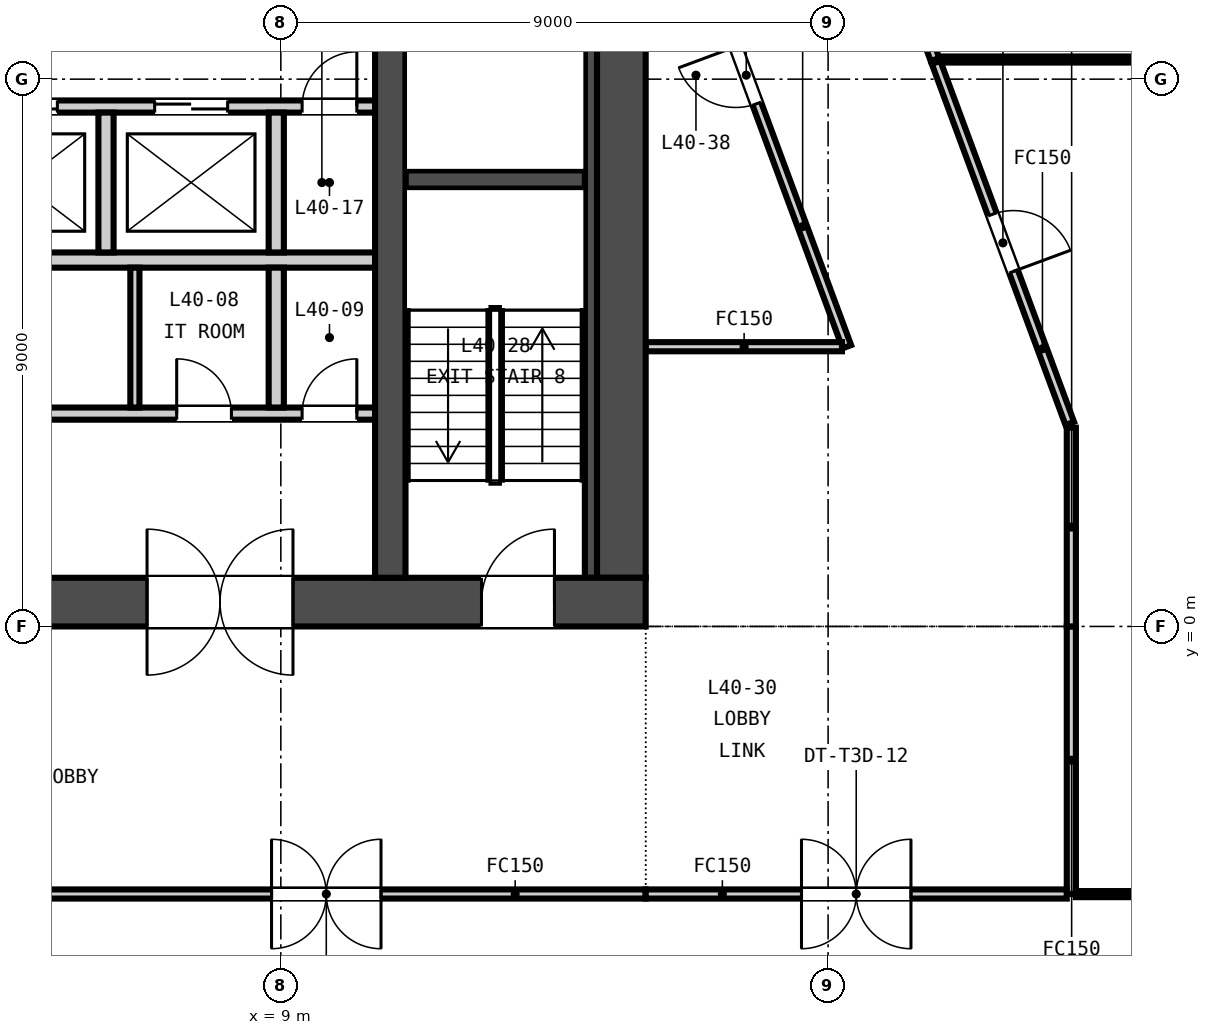
"""IFC4 building model, lengths in metres.
Left out: names, types, materials, properties, quantities, classifications, styles, units other than length and angle.
Written with IfcOpenShell. Run it as: python <this file> out.ifc"""

import sys

from ifc_helpers import new_model, si_unit, direction, frame, frame_2d, origin, place, context, subcontext, project, spatial, rectangle, extrude, element, fill, save


model = new_model("IFC4")
c1 = context("Model", 3, precision=1e-05, world=origin(), true_north=direction((0.0, 1.0)))
c2 = subcontext(c1, "Body", "Model", "MODEL_VIEW")
j1 = project(units=[si_unit("LENGTHUNIT", "METRE"), si_unit("PLANEANGLEUNIT", "RADIAN")], contexts=[c1])
p1 = place(None, origin())
s1 = spatial("IfcSite", under=j1, at=p1, CompositionType="ELEMENT")
p2 = place(p1, origin())
s2 = spatial("IfcBuilding", under=s1, at=p2, CompositionType="ELEMENT")
p3 = place(p2, frame((0.0, 0.0, 162.65)))
s3 = spatial("IfcBuildingStorey", under=s2, at=p3, CompositionType="ELEMENT", Elevation=162.65)
p4 = place(p3, frame((-15.0, 0.4, -0.15), z_axis=(0.0, 0.0, 1.0), x_axis=(1.0, 0.0, 0.0)))
e1 = element("IfcWall", 1, at=p4, inside=s3, PredefinedType="SOLIDWALL", context=c2, shape_type="SweptSolid", body=[
    extrude(rectangle(XDim=30.0, YDim=0.8, at=frame_2d((15.0, 0.0))), origin(), (0.0, 0.0, 1.0), 3.5),
])
p5 = place(p4, frame((5.8, 0.0, 0.15)))
e2 = element("IfcOpeningElement", 2, at=p5, cuts=e1, PredefinedType="OPENING", context=c2, shape_type="SweptSolid", body=[
    extrude(rectangle(XDim=2.4, YDim=2.4, at=frame_2d((1.2, 1.2))), frame((0.0, 0.41, 0.0), z_axis=(0.0, -1.0, 0.0), x_axis=(1.0, 0.0, 0.0)), (0.0, 0.0, 1.0), 0.82),
])
p6 = place(p4, frame((13.8, 0.0, 0.15)))
e3 = element("IfcOpeningElement", 3, at=p6, cuts=e1, PredefinedType="OPENING", context=c2, shape_type="SweptSolid", body=[
    extrude(rectangle(XDim=2.4, YDim=2.4, at=frame_2d((1.2, 1.2))), frame((0.0, 0.41, 0.0), z_axis=(0.0, -1.0, 0.0), x_axis=(1.0, 0.0, 0.0)), (0.0, 0.0, 1.0), 0.82),
])
p7 = place(p4, frame((21.8, 0.0, 0.15)))
e4 = element("IfcOpeningElement", 4, at=p7, cuts=e1, PredefinedType="OPENING", context=c2, shape_type="SweptSolid", body=[
    extrude(rectangle(XDim=2.4, YDim=2.4, at=frame_2d((1.2, 1.2))), frame((0.0, 0.41, 0.0), z_axis=(0.0, -1.0, 0.0), x_axis=(1.0, 0.0, 0.0)), (0.0, 0.0, 1.0), 0.82),
])
p8 = place(p4, frame((1.5, 0.0, 0.15)))
e5 = element("IfcOpeningElement", 5, at=p8, cuts=e1, PredefinedType="OPENING", context=c2, shape_type="SweptSolid", body=[
    extrude(rectangle(XDim=1.2, YDim=2.1, at=frame_2d((0.6, 1.05))), frame((0.0, 0.41, 0.0), z_axis=(0.0, -1.0, 0.0), x_axis=(1.0, 0.0, 0.0)), (0.0, 0.0, 1.0), 0.82),
])
p9 = place(p4, frame((27.3, 0.0, 0.15)))
e6 = element("IfcOpeningElement", 6, at=p9, cuts=e1, PredefinedType="OPENING", context=c2, shape_type="SweptSolid", body=[
    extrude(rectangle(XDim=1.2, YDim=2.1, at=frame_2d((0.6, 1.05))), frame((0.0, 0.41, 0.0), z_axis=(0.0, -1.0, 0.0), x_axis=(1.0, 0.0, 0.0)), (0.0, 0.0, 1.0), 0.82),
])
p10 = place(p3, frame((14.6, 0.8, -0.15), z_axis=(0.0, 0.0, 1.0), x_axis=(0.0, 1.0, 0.0)))
e7 = element("IfcWall", 7, at=p10, inside=s3, PredefinedType="SOLIDWALL", context=c2, shape_type="SweptSolid", body=[
    extrude(rectangle(XDim=13.4, YDim=0.8, at=frame_2d((6.7, 0.0))), origin(), (0.0, 0.0, 1.0), 3.5),
])
p11 = place(p3, frame((10.8, 0.8, -0.15), z_axis=(0.0, 0.0, 1.0), x_axis=(0.0, 1.0, 0.0)))
e8 = element("IfcWall", 8, at=p11, inside=s3, PredefinedType="SOLIDWALL", context=c2, shape_type="SweptSolid", body=[
    extrude(rectangle(XDim=13.4, YDim=0.5, at=frame_2d((6.7, 0.0))), origin(), (0.0, 0.0, 1.0), 3.5),
])
p12 = place(p3, frame((-10.55, 3.5, 0.0), z_axis=(0.0, 0.0, 1.0), x_axis=(1.0, 0.0, 0.0)))
e9 = element("IfcWall", 9, at=p12, inside=s3, PredefinedType="PARTITIONING", context=c2, shape_type="SweptSolid", body=[
    extrude(rectangle(XDim=21.1, YDim=0.2, at=frame_2d((10.55, 0.0))), origin(), (0.0, 0.0, 1.0), 3.35),
])
p13 = place(p12, frame((2.312, 0.0, 0.0)))
e10 = element("IfcOpeningElement", 10, at=p13, cuts=e9, PredefinedType="OPENING", context=c2, shape_type="SweptSolid", body=[
    extrude(rectangle(XDim=1.0, YDim=2.1, at=frame_2d((0.5, 1.05))), frame((0.0, 0.11, 0.0), z_axis=(0.0, -1.0, 0.0), x_axis=(1.0, 0.0, 0.0)), (0.0, 0.0, 1.0), 0.22),
])
p14 = place(p12, frame((7.05, 0.0, 0.0)))
e11 = element("IfcOpeningElement", 11, at=p14, cuts=e9, PredefinedType="OPENING", context=c2, shape_type="SweptSolid", body=[
    extrude(rectangle(XDim=1.0, YDim=2.1, at=frame_2d((0.5, 1.05))), frame((0.0, 0.11, 0.0), z_axis=(0.0, -1.0, 0.0), x_axis=(1.0, 0.0, 0.0)), (0.0, 0.0, 1.0), 0.22),
])
p15 = place(p12, frame((10.175, 0.0, 0.0)))
e12 = element("IfcOpeningElement", 12, at=p15, cuts=e9, PredefinedType="OPENING", context=c2, shape_type="SweptSolid", body=[
    extrude(rectangle(XDim=1.0, YDim=2.1, at=frame_2d((0.5, 1.05))), frame((0.0, 0.11, 0.0), z_axis=(0.0, -1.0, 0.0), x_axis=(1.0, 0.0, 0.0)), (0.0, 0.0, 1.0), 0.22),
])
p16 = place(p12, frame((14.05, 0.0, 0.0)))
e13 = element("IfcOpeningElement", 13, at=p16, cuts=e9, PredefinedType="OPENING", context=c2, shape_type="SweptSolid", body=[
    extrude(rectangle(XDim=1.0, YDim=2.1, at=frame_2d((0.5, 1.05))), frame((0.0, 0.11, 0.0), z_axis=(0.0, -1.0, 0.0), x_axis=(1.0, 0.0, 0.0)), (0.0, 0.0, 1.0), 0.22),
])
p17 = place(p12, frame((17.837, 0.0, 0.0)))
e14 = element("IfcOpeningElement", 14, at=p17, cuts=e9, PredefinedType="OPENING", context=c2, shape_type="SweptSolid", body=[
    extrude(rectangle(XDim=0.9, YDim=2.1, at=frame_2d((0.45, 1.05))), frame((0.0, 0.11, 0.0), z_axis=(0.0, -1.0, 0.0), x_axis=(1.0, 0.0, 0.0)), (0.0, 0.0, 1.0), 0.22),
])
p18 = place(p12, frame((19.9, 0.0, 0.0)))
e15 = element("IfcOpeningElement", 15, at=p18, cuts=e9, PredefinedType="OPENING", context=c2, shape_type="SweptSolid", body=[
    extrude(rectangle(XDim=0.9, YDim=2.1, at=frame_2d((0.45, 1.05))), frame((0.0, 0.11, 0.0), z_axis=(0.0, -1.0, 0.0), x_axis=(1.0, 0.0, 0.0)), (0.0, 0.0, 1.0), 0.22),
])
p19 = place(p3, frame((-10.55, 6.025, 0.0), z_axis=(0.0, 0.0, 1.0), x_axis=(1.0, 0.0, 0.0)))
e16 = element("IfcWall", 16, at=p19, inside=s3, PredefinedType="PARTITIONING", context=c2, shape_type="SweptSolid", body=[
    extrude(rectangle(XDim=21.1, YDim=0.25, at=frame_2d((10.55, 0.0))), origin(), (0.0, 0.0, 1.0), 3.35),
])
p20 = place(p3, frame((-10.55, 8.55, 0.0), z_axis=(0.0, 0.0, 1.0), x_axis=(1.0, 0.0, 0.0)))
e17 = element("IfcWall", 17, at=p20, inside=s3, PredefinedType="PARTITIONING", context=c2, shape_type="SweptSolid", body=[
    extrude(rectangle(XDim=21.1, YDim=0.2, at=frame_2d((10.55, 0.0))), origin(), (0.0, 0.0, 1.0), 3.35),
])
p21 = place(p20, frame((0.675, 0.0, 0.0)))
e18 = element("IfcOpeningElement", 18, at=p21, cuts=e17, PredefinedType="OPENING", context=c2, shape_type="SweptSolid", body=[
    extrude(rectangle(XDim=1.2, YDim=2.1, at=frame_2d((0.6, 1.05))), frame((0.0, 0.11, 0.0), z_axis=(0.0, -1.0, 0.0), x_axis=(1.0, 0.0, 0.0)), (0.0, 0.0, 1.0), 0.22),
])
p22 = place(p20, frame((3.475, 0.0, 0.0)))
e19 = element("IfcOpeningElement", 19, at=p22, cuts=e17, PredefinedType="OPENING", context=c2, shape_type="SweptSolid", body=[
    extrude(rectangle(XDim=1.2, YDim=2.1, at=frame_2d((0.6, 1.05))), frame((0.0, 0.11, 0.0), z_axis=(0.0, -1.0, 0.0), x_axis=(1.0, 0.0, 0.0)), (0.0, 0.0, 1.0), 0.22),
])
p23 = place(p20, frame((6.275, 0.0, 0.0)))
e20 = element("IfcOpeningElement", 20, at=p23, cuts=e17, PredefinedType="OPENING", context=c2, shape_type="SweptSolid", body=[
    extrude(rectangle(XDim=1.2, YDim=2.1, at=frame_2d((0.6, 1.05))), frame((0.0, 0.11, 0.0), z_axis=(0.0, -1.0, 0.0), x_axis=(1.0, 0.0, 0.0)), (0.0, 0.0, 1.0), 0.22),
])
p24 = place(p20, frame((9.075, 0.0, 0.0)))
e21 = element("IfcOpeningElement", 21, at=p24, cuts=e17, PredefinedType="OPENING", context=c2, shape_type="SweptSolid", body=[
    extrude(rectangle(XDim=1.2, YDim=2.1, at=frame_2d((0.6, 1.05))), frame((0.0, 0.11, 0.0), z_axis=(0.0, -1.0, 0.0), x_axis=(1.0, 0.0, 0.0)), (0.0, 0.0, 1.0), 0.22),
])
p25 = place(p20, frame((11.875, 0.0, 0.0)))
e22 = element("IfcOpeningElement", 22, at=p25, cuts=e17, PredefinedType="OPENING", context=c2, shape_type="SweptSolid", body=[
    extrude(rectangle(XDim=1.2, YDim=2.1, at=frame_2d((0.6, 1.05))), frame((0.0, 0.11, 0.0), z_axis=(0.0, -1.0, 0.0), x_axis=(1.0, 0.0, 0.0)), (0.0, 0.0, 1.0), 0.22),
])
p26 = place(p20, frame((14.675, 0.0, 0.0)))
e23 = element("IfcOpeningElement", 23, at=p26, cuts=e17, PredefinedType="OPENING", context=c2, shape_type="SweptSolid", body=[
    extrude(rectangle(XDim=1.2, YDim=2.1, at=frame_2d((0.6, 1.05))), frame((0.0, 0.11, 0.0), z_axis=(0.0, -1.0, 0.0), x_axis=(1.0, 0.0, 0.0)), (0.0, 0.0, 1.0), 0.22),
])
p27 = place(p20, frame((17.475, 0.0, 0.0)))
e24 = element("IfcOpeningElement", 24, at=p27, cuts=e17, PredefinedType="OPENING", context=c2, shape_type="SweptSolid", body=[
    extrude(rectangle(XDim=1.2, YDim=2.1, at=frame_2d((0.6, 1.05))), frame((0.0, 0.11, 0.0), z_axis=(0.0, -1.0, 0.0), x_axis=(1.0, 0.0, 0.0)), (0.0, 0.0, 1.0), 0.22),
])
p28 = place(p20, frame((19.9, 0.0, 0.0)))
e25 = element("IfcOpeningElement", 25, at=p28, cuts=e17, PredefinedType="OPENING", context=c2, shape_type="SweptSolid", body=[
    extrude(rectangle(XDim=0.9, YDim=2.1, at=frame_2d((0.45, 1.05))), frame((0.0, 0.11, 0.0), z_axis=(0.0, -1.0, 0.0), x_axis=(1.0, 0.0, 0.0)), (0.0, 0.0, 1.0), 0.22),
])
p29 = place(p3, frame((6.6, 3.6, 0.0), z_axis=(0.0, 0.0, 1.0), x_axis=(0.0, 1.0, 0.0)))
e26 = element("IfcWall", 26, at=p29, inside=s3, PredefinedType="PARTITIONING", context=c2, shape_type="SweptSolid", body=[
    extrude(rectangle(XDim=2.3, YDim=0.15, at=frame_2d((1.15, 0.0))), origin(), (0.0, 0.0, 1.0), 3.35),
])
p30 = place(p3, frame((8.925, 3.6, 0.0), z_axis=(0.0, 0.0, 1.0), x_axis=(0.0, 1.0, 0.0)))
e27 = element("IfcWall", 27, at=p30, inside=s3, PredefinedType="PARTITIONING", context=c2, shape_type="SweptSolid", body=[
    extrude(rectangle(XDim=2.3, YDim=0.25, at=frame_2d((1.15, 0.0))), origin(), (0.0, 0.0, 1.0), 3.35),
])
for number, where, z_axis, x_axis in (
    (28, (6.125, 6.15, 0.0), (0.0, 0.0, 1.0), (0.0, 1.0, 0.0)),
    (29, (8.925, 6.15, 0.0), (0.0, 0.0, 1.0), (0.0, 1.0, 0.0)),
):
    element("IfcWall", number, at=place(p3, frame(where, z_axis=z_axis, x_axis=x_axis)), inside=s3, PredefinedType="PARTITIONING", context=c2, shape_type="SweptSolid", body=[
        extrude(rectangle(XDim=2.3, YDim=0.25, at=frame_2d((1.15, 0.0))), origin(), (0.0, 0.0, 1.0), 3.35),
    ])
p31 = place(p3, frame((11.05, 7.35, 0.0), z_axis=(0.0, 0.0, 1.0), x_axis=(1.0, 0.0, 0.0)))
e30 = element("IfcWall", 30, at=p31, inside=s3, PredefinedType="SOLIDWALL", context=c2, shape_type="SweptSolid", body=[
    extrude(rectangle(XDim=2.95, YDim=0.3, at=frame_2d((1.475, 0.0))), origin(), (0.0, 0.0, 1.0), 3.35),
])
p32 = place(p3, frame((14.1, 0.8, 0.0), z_axis=(0.0, 0.0, 1.0), x_axis=(0.0, 1.0, 0.0)))
e31 = element("IfcWall", 31, at=p32, inside=s3, PredefinedType="SOLIDWALL", context=c2, shape_type="SweptSolid", body=[
    extrude(rectangle(XDim=13.4, YDim=0.2, at=frame_2d((6.7, 0.0))), origin(), (0.0, 0.0, 1.0), 3.35),
])
p33 = place(p3, frame((15.0, -4.4, 0.0), z_axis=(0.0, 0.0, 1.0), x_axis=(-1.0, 0.0, 0.0)))
e32 = element("IfcWall", 32, at=p33, inside=s3, PredefinedType="PARTITIONING", context=c2, shape_type="SweptSolid", body=[
    extrude(rectangle(XDim=10.505, YDim=0.15, at=frame_2d((5.252, 0.0))), origin(), (0.0, 0.0, 1.0), 2.591),
])
p34 = place(p33, frame((4.353, 0.0, 0.0)))
e33 = element("IfcOpeningElement", 33, at=p34, cuts=e32, PredefinedType="OPENING", context=c2, shape_type="SweptSolid", body=[
    extrude(rectangle(XDim=1.8, YDim=2.1, at=frame_2d((0.9, 1.05))), frame((0.0, 0.085, 0.0), z_axis=(0.0, -1.0, 0.0), x_axis=(1.0, 0.0, 0.0)), (0.0, 0.0, 1.0), 0.17),
])
p35 = place(p3, frame((22.0, 0.0, 0.0), z_axis=(0.0, 0.0, 1.0), x_axis=(0.0, -1.0, 0.0)))
e34 = element("IfcWall", 34, at=p35, inside=s3, PredefinedType="PARTITIONING", context=c2, shape_type="SweptSolid", body=[
    extrude(rectangle(XDim=4.4, YDim=0.15, at=frame_2d((2.2, 0.0))), origin(), (0.0, 0.0, 1.0), 2.591),
])
p36 = place(p3, frame((21.925, -4.4, 0.0), z_axis=(0.0, 0.0, 1.0), x_axis=(-1.0, 0.0, 0.0)))
e35 = element("IfcWall", 35, at=p36, inside=s3, PredefinedType="PARTITIONING", context=c2, shape_type="SweptSolid", body=[
    extrude(rectangle(XDim=6.925, YDim=0.15, at=frame_2d((3.462, 0.0))), origin(), (0.0, 0.0, 1.0), 2.591),
])
p37 = place(p36, frame((2.562, 0.0, 0.0)))
e36 = element("IfcOpeningElement", 36, at=p37, cuts=e35, PredefinedType="OPENING", context=c2, shape_type="SweptSolid", body=[
    extrude(rectangle(XDim=1.8, YDim=2.1, at=frame_2d((0.9, 1.05))), frame((0.0, 0.085, 0.0), z_axis=(0.0, -1.0, 0.0), x_axis=(1.0, 0.0, 0.0)), (0.0, 0.0, 1.0), 0.17),
])
p38 = place(p3, frame((18.308, 4.6, 0.0), z_axis=(0.0, 0.0, 1.0), x_axis=(-0.347347751601, 0.937736391241, 0.0)))
e37 = element("IfcWall", 37, at=p38, inside=s3, PredefinedType="PARTITIONING", context=c2, shape_type="SweptSolid", body=[
    extrude(rectangle(XDim=9.524, YDim=0.15, at=frame_2d((4.762, 0.0))), origin(), (0.0, 0.0, 1.0), 2.591),
])
p39 = place(p38, frame((4.262, 0.0, 0.0)))
e38 = element("IfcOpeningElement", 38, at=p39, cuts=e37, PredefinedType="OPENING", context=c2, shape_type="SweptSolid", body=[
    extrude(rectangle(XDim=1.0, YDim=2.1, at=frame_2d((0.5, 1.05))), frame((0.0, 0.085, 0.0), z_axis=(0.0, -1.0, 0.0), x_axis=(1.0, 0.0, 0.0)), (0.0, 0.0, 1.0), 0.17),
])
p40 = place(p3, frame((22.0, 3.269, 0.0), z_axis=(0.0, 0.0, 1.0), x_axis=(0.0, -1.0, 0.0)))
e39 = element("IfcWall", 39, at=p40, inside=s3, PredefinedType="PARTITIONING", context=c2, shape_type="SweptSolid", body=[
    extrude(rectangle(XDim=3.269, YDim=0.15, at=frame_2d((1.635, 0.0))), origin(), (0.0, 0.0, 1.0), 2.591),
])
p41 = place(p3, frame((17.74, 14.769, 0.0), z_axis=(0.0, 0.0, 1.0), x_axis=(0.347393763434, -0.937719346674, 0.0)))
e40 = element("IfcWall", 40, at=p41, inside=s3, PredefinedType="PARTITIONING", context=c2, shape_type="SweptSolid", body=[
    extrude(rectangle(XDim=5.808, YDim=0.15, at=frame_2d((2.904, 0.0))), origin(), (0.0, 0.0, 1.0), 2.591),
])
p42 = place(p41, frame((2.404, 0.0, 0.0)))
e41 = element("IfcOpeningElement", 41, at=p42, cuts=e40, PredefinedType="OPENING", context=c2, shape_type="SweptSolid", body=[
    extrude(rectangle(XDim=1.0, YDim=2.1, at=frame_2d((0.5, 1.05))), frame((0.0, 0.085, 0.0), z_axis=(0.0, -1.0, 0.0), x_axis=(1.0, 0.0, 0.0)), (0.0, 0.0, 1.0), 0.17),
])
p43 = place(p3, frame((19.833, 9.323, 0.0), z_axis=(0.0, 0.0, 1.0), x_axis=(1.0, 0.0, 0.0)))
e42 = element("IfcWall", 42, at=p43, inside=s3, PredefinedType="PARTITIONING", context=c2, shape_type="SweptSolid", body=[
    extrude(rectangle(XDim=7.819, YDim=0.1, at=frame_2d((3.91, 0.0))), origin(), (0.0, 0.0, 1.0), 2.591),
])
p44 = place(p3, frame((15.0, 4.6, 0.0), z_axis=(0.0, 0.0, 1.0), x_axis=(1.0, 0.0, 0.0)))
e43 = element("IfcWall", 43, at=p44, inside=s3, PredefinedType="PARTITIONING", context=c2, shape_type="SweptSolid", body=[
    extrude(rectangle(XDim=3.228, YDim=0.15, at=frame_2d((1.614, 0.0))), origin(), (0.0, 0.0, 1.0), 2.591),
])
p45 = place(p3, frame((19.775, 9.276, 0.0), z_axis=(0.0, 0.0, 1.0), x_axis=(0.347304307854, -0.937752482133, 0.0)))
e44 = element("IfcWall", 44, at=p45, inside=s3, PredefinedType="PARTITIONING", context=c2, shape_type="SweptSolid", body=[
    extrude(rectangle(XDim=6.331, YDim=0.15, at=frame_2d((3.166, 0.0))), origin(), (0.0, 0.0, 1.0), 2.591),
])
p46 = place(p45, frame((2.665, 0.0, 0.0)))
e45 = element("IfcOpeningElement", 45, at=p46, cuts=e44, PredefinedType="OPENING", context=c2, shape_type="SweptSolid", body=[
    extrude(rectangle(XDim=1.0, YDim=2.1, at=frame_2d((0.5, 1.05))), frame((0.0, 0.085, 0.0), z_axis=(0.0, -1.0, 0.0), x_axis=(1.0, 0.0, 0.0)), (0.0, 0.0, 1.0), 0.17),
])
p47 = place(p3, frame((22.075, -4.402, 0.0), z_axis=(0.0, 0.0, 1.0), x_axis=(1.0, 0.0, 0.0)))
e46 = element("IfcWall", 46, at=p47, inside=s3, PredefinedType="PARTITIONING", context=c2, shape_type="SweptSolid", body=[
    extrude(rectangle(XDim=7.022, YDim=0.1, at=frame_2d((3.511, 0.0))), origin(), (0.0, 0.0, 1.0), 2.591),
])
p48 = place(p17, origin())
e47 = element("IfcDoor", 47, at=p48, inside=s3, OperationType="SINGLE_SWING_LEFT", PredefinedType="DOOR", context=c2, shape_type="SweptSolid", body=[
    extrude(rectangle(XDim=0.9, YDim=2.1, at=frame_2d((0.45, 1.05))), frame((0.0, 0.025, 0.0), z_axis=(0.0, -1.0, 0.0), x_axis=(1.0, 0.0, 0.0)), (0.0, 0.0, 1.0), 0.05),
])
fill(e14, e47)
p49 = place(p18, origin())
e48 = element("IfcDoor", 48, at=p49, inside=s3, OperationType="SINGLE_SWING_RIGHT", PredefinedType="DOOR", context=c2, shape_type="SweptSolid", body=[
    extrude(rectangle(XDim=0.9, YDim=2.1, at=frame_2d((0.45, 1.05))), frame((0.0, 0.025, 0.0), z_axis=(0.0, -1.0, 0.0), x_axis=(1.0, 0.0, 0.0)), (0.0, 0.0, 1.0), 0.05),
])
fill(e15, e48)
p50 = place(p26, origin())
e49 = element("IfcDoor", 49, at=p50, inside=s3, OperationType="DOUBLE_DOOR_SLIDING", PredefinedType="DOOR", context=c2, shape_type="SweptSolid", body=[
    extrude(rectangle(XDim=1.2, YDim=2.1, at=frame_2d((0.6, 1.05))), frame((0.0, 0.025, 0.0), z_axis=(0.0, -1.0, 0.0), x_axis=(1.0, 0.0, 0.0)), (0.0, 0.0, 1.0), 0.05),
])
fill(e23, e49)
p51 = place(p27, origin())
e50 = element("IfcDoor", 50, at=p51, inside=s3, OperationType="DOUBLE_DOOR_SLIDING", PredefinedType="DOOR", context=c2, shape_type="SweptSolid", body=[
    extrude(rectangle(XDim=1.2, YDim=2.1, at=frame_2d((0.6, 1.05))), frame((0.0, 0.025, 0.0), z_axis=(0.0, -1.0, 0.0), x_axis=(1.0, 0.0, 0.0)), (0.0, 0.0, 1.0), 0.05),
])
fill(e24, e50)
p52 = place(p28, origin())
e51 = element("IfcDoor", 51, at=p52, inside=s3, OperationType="SINGLE_SWING_RIGHT", PredefinedType="DOOR", context=c2, shape_type="SweptSolid", body=[
    extrude(rectangle(XDim=0.9, YDim=2.1, at=frame_2d((0.45, 1.05))), frame((0.0, 0.025, 0.0), z_axis=(0.0, -1.0, 0.0), x_axis=(1.0, 0.0, 0.0)), (0.0, 0.0, 1.0), 0.05),
])
fill(e25, e51)
p53 = place(p7, origin())
e52 = element("IfcDoor", 52, at=p53, inside=s3, OperationType="DOUBLE_DOOR_DOUBLE_SWING", PredefinedType="DOOR", context=c2, shape_type="SweptSolid", body=[
    extrude(rectangle(XDim=2.4, YDim=2.4, at=frame_2d((1.2, 1.2))), frame((0.0, 0.025, 0.0), z_axis=(0.0, -1.0, 0.0), x_axis=(1.0, 0.0, 0.0)), (0.0, 0.0, 1.0), 0.05),
])
fill(e4, e52)
p54 = place(p9, origin())
e53 = element("IfcDoor", 53, at=p54, inside=s3, OperationType="SINGLE_SWING_RIGHT", PredefinedType="DOOR", context=c2, shape_type="SweptSolid", body=[
    extrude(rectangle(XDim=1.2, YDim=2.1, at=frame_2d((0.6, 1.05))), frame((0.0, 0.025, 0.0), z_axis=(0.0, -1.0, 0.0), x_axis=(1.0, 0.0, 0.0)), (0.0, 0.0, 1.0), 0.05),
])
fill(e6, e53)
p55 = place(p39, origin())
e54 = element("IfcDoor", 54, at=p55, inside=s3, OperationType="SINGLE_SWING_RIGHT", PredefinedType="DOOR", context=c2, shape_type="SweptSolid", body=[
    extrude(rectangle(XDim=1.0, YDim=2.1, at=frame_2d((0.5, 1.05))), frame((0.0, 0.025, 0.0), z_axis=(0.0, -1.0, 0.0), x_axis=(1.0, 0.0, 0.0)), (0.0, 0.0, 1.0), 0.05),
])
fill(e38, e54)
p56 = place(p46, origin())
e55 = element("IfcDoor", 55, at=p56, inside=s3, OperationType="SINGLE_SWING_RIGHT", PredefinedType="DOOR", context=c2, shape_type="SweptSolid", body=[
    extrude(rectangle(XDim=1.0, YDim=2.1, at=frame_2d((0.5, 1.05))), frame((0.0, 0.025, 0.0), z_axis=(0.0, -1.0, 0.0), x_axis=(1.0, 0.0, 0.0)), (0.0, 0.0, 1.0), 0.05),
])
fill(e45, e55)
p57 = place(p34, origin())
e56 = element("IfcDoor", 56, at=p57, inside=s3, OperationType="DOUBLE_DOOR_DOUBLE_SWING", PredefinedType="DOOR", context=c2, shape_type="SweptSolid", body=[
    extrude(rectangle(XDim=1.8, YDim=2.1, at=frame_2d((0.9, 1.05))), frame((0.0, 0.025, 0.0), z_axis=(0.0, -1.0, 0.0), x_axis=(1.0, 0.0, 0.0)), (0.0, 0.0, 1.0), 0.05),
])
fill(e33, e56)
p58 = place(p37, origin())
e57 = element("IfcDoor", 57, at=p58, inside=s3, OperationType="DOUBLE_DOOR_DOUBLE_SWING", PredefinedType="DOOR", context=c2, shape_type="SweptSolid", body=[
    extrude(rectangle(XDim=1.8, YDim=2.1, at=frame_2d((0.9, 1.05))), frame((0.0, 0.025, 0.0), z_axis=(0.0, -1.0, 0.0), x_axis=(1.0, 0.0, 0.0)), (0.0, 0.0, 1.0), 0.05),
])
fill(e36, e57)
save(model, sys.argv[1])
